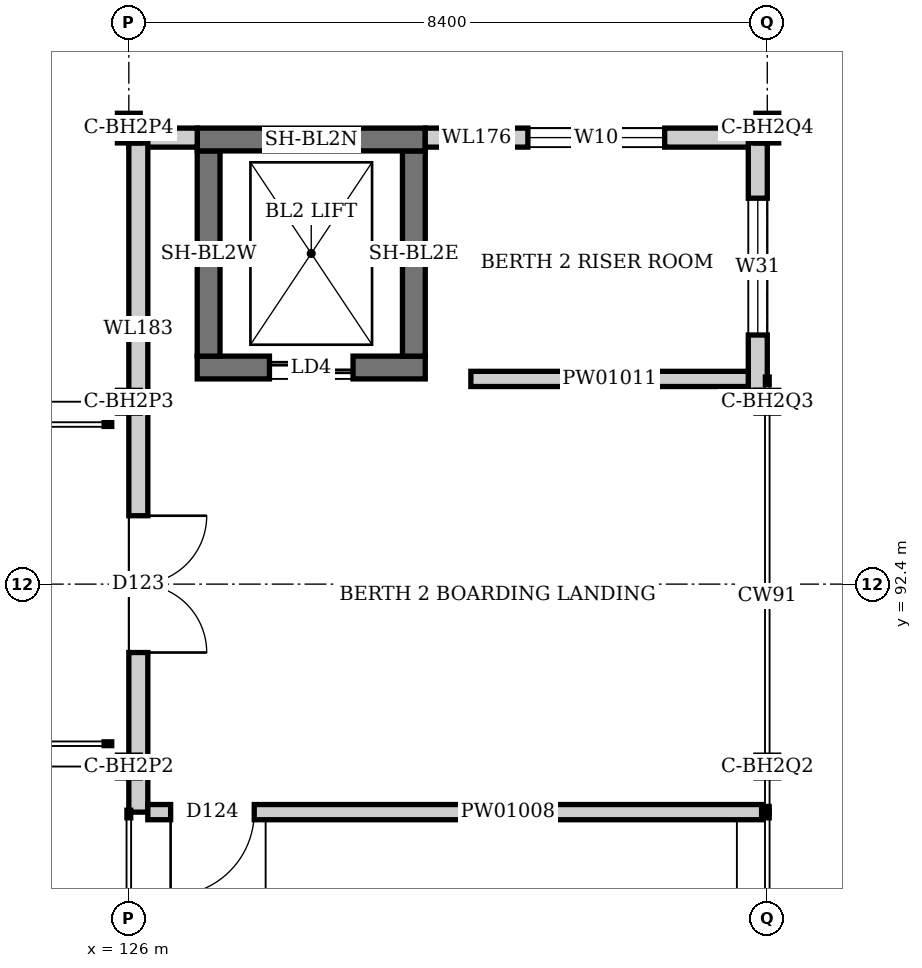
"""IFC4 building model, lengths in metres.
Left out: names, types, materials, properties, quantities, classifications, styles, units other than length and angle.
Written with IfcOpenShell. Run it as: python <this file> out.ifc"""

import sys

from ifc_helpers import new_model, si_unit, direction, frame, frame_2d, origin, origin_2d, place, context, subcontext, project, spatial, rectangle, i_section, extrude, element, fill, save


model = new_model("IFC4")
c1 = context("Model", 3, precision=1e-05, world=origin(), true_north=direction((0.0, 1.0)))
c2 = subcontext(c1, "Body", "Model", "MODEL_VIEW")
j1 = project(units=[si_unit("LENGTHUNIT", "METRE"), si_unit("PLANEANGLEUNIT", "RADIAN")], contexts=[c1])
p1 = place(None, origin())
s1 = spatial("IfcSite", under=j1, at=p1, CompositionType="ELEMENT")
p2 = place(p1, origin())
s2 = spatial("IfcBuilding", under=s1, at=p2, CompositionType="ELEMENT")
p3 = place(p2, frame((0.0, 0.0, 6.0)))
s3 = spatial("IfcBuildingStorey", under=s2, at=p3, CompositionType="ELEMENT", Elevation=6.0)
p4 = place(p3, frame((126.9, 95.25, 0.0), z_axis=(0.0, 0.0, 1.0), x_axis=(1.0, 0.0, 0.0)))
e1 = element("IfcWall", 1, at=p4, inside=s3, PredefinedType="SHEAR", context=c2, shape_type="SweptSolid", body=[
    extrude(rectangle(XDim=3.0, YDim=0.3, at=frame_2d((1.5, 0.0))), origin(), (0.0, 0.0, 1.0), 4.65),
])
p5 = place(p4, frame((0.95, 0.0, 0.0)))
e2 = element("IfcOpeningElement", 2, at=p5, cuts=e1, PredefinedType="OPENING", context=c2, shape_type="SweptSolid", body=[
    extrude(rectangle(XDim=1.1, YDim=2.1, at=frame_2d((0.55, 1.05))), frame((0.0, 0.16, 0.0), z_axis=(0.0, -1.0, 0.0), x_axis=(1.0, 0.0, 0.0)), (0.0, 0.0, 1.0), 0.32),
])
for number, where, z_axis, x_axis in (
    (3, (129.75, 95.4, 0.0), (0.0, 0.0, 1.0), (0.0, 1.0, 0.0)),
    (4, (127.05, 95.4, 0.0), (0.0, 0.0, 1.0), (0.0, 1.0, 0.0)),
):
    element("IfcWall", number, at=place(p3, frame(where, z_axis=z_axis, x_axis=x_axis)), inside=s3, PredefinedType="SHEAR", context=c2, shape_type="SweptSolid", body=[
        extrude(rectangle(XDim=2.7, YDim=0.3, at=frame_2d((1.35, 0.0))), origin(), (0.0, 0.0, 1.0), 4.65),
    ])
p6 = place(p3, frame((126.9, 98.25, 0.0), z_axis=(0.0, 0.0, 1.0), x_axis=(1.0, 0.0, 0.0)))
e5 = element("IfcWall", 5, at=p6, inside=s3, PredefinedType="SHEAR", context=c2, shape_type="SweptSolid", body=[
    extrude(rectangle(XDim=3.0, YDim=0.3, at=frame_2d((1.5, 0.0))), origin(), (0.0, 0.0, 1.0), 4.65),
])
for number, where, z_axis, x_axis in (
    (6, (126.0, 90.0, 0.0), (0.0, 0.0, 1.0), (1.0, 0.0, 0.0)),
    (7, (126.0, 94.8, 0.0), (0.0, 0.0, 1.0), (1.0, 0.0, 0.0)),
):
    element("IfcColumn", number, at=place(p3, frame(where, z_axis=z_axis, x_axis=x_axis)), inside=s3, PredefinedType="COLUMN", context=c2, shape_type="SweptSolid", body=[
        extrude(i_section(OverallWidth=0.3, OverallDepth=0.3, WebThickness=0.011, FlangeThickness=0.019, at=origin_2d()), origin(), (0.0, 0.0, 1.0), 4.8),
    ])
p7 = place(p3, frame((126.0, 98.4, 0.0), z_axis=(0.0, 0.0, 1.0), x_axis=(1.0, 0.0, 0.0)))
e8 = element("IfcColumn", 8, at=p7, inside=s3, PredefinedType="COLUMN", context=c2, shape_type="SweptSolid", body=[
    extrude(i_section(OverallWidth=0.3, OverallDepth=0.39, WebThickness=0.011, FlangeThickness=0.019, at=origin_2d()), origin(), (0.0, 0.0, 1.0), 4.8),
])
for number, where, z_axis, x_axis in (
    (9, (134.4, 90.0, 0.0), (0.0, 0.0, 1.0), (1.0, 0.0, 0.0)),
    (10, (134.4, 94.8, 0.0), (0.0, 0.0, 1.0), (1.0, 0.0, 0.0)),
):
    element("IfcColumn", number, at=place(p3, frame(where, z_axis=z_axis, x_axis=x_axis)), inside=s3, PredefinedType="COLUMN", context=c2, shape_type="SweptSolid", body=[
        extrude(i_section(OverallWidth=0.3, OverallDepth=0.3, WebThickness=0.011, FlangeThickness=0.019, at=origin_2d()), origin(), (0.0, 0.0, 1.0), 4.8),
    ])
p8 = place(p3, frame((134.4, 98.4, 0.0), z_axis=(0.0, 0.0, 1.0), x_axis=(1.0, 0.0, 0.0)))
e11 = element("IfcColumn", 11, at=p8, inside=s3, PredefinedType="COLUMN", context=c2, shape_type="SweptSolid", body=[
    extrude(i_section(OverallWidth=0.3, OverallDepth=0.39, WebThickness=0.011, FlangeThickness=0.019, at=origin_2d()), origin(), (0.0, 0.0, 1.0), 4.8),
])
p9 = place(p3, frame((126.0, 98.275, 0.0), z_axis=(0.0, 0.0, 1.0), x_axis=(1.0, 0.0, 0.0)))
e12 = element("IfcWall", 12, at=p9, inside=s3, PredefinedType="SOLIDWALL", context=c2, shape_type="SweptSolid", body=[
    extrude(rectangle(XDim=0.9, YDim=0.25, at=frame_2d((0.45, 0.0))), origin(), (0.0, 0.0, 1.0), 4.6),
])
p10 = place(p3, frame((129.9, 98.275, 0.0), z_axis=(0.0, 0.0, 1.0), x_axis=(1.0, 0.0, 0.0)))
e13 = element("IfcWall", 13, at=p10, inside=s3, PredefinedType="SOLIDWALL", context=c2, shape_type="SweptSolid", body=[
    extrude(rectangle(XDim=4.5, YDim=0.25, at=frame_2d((2.25, 0.0))), origin(), (0.0, 0.0, 1.0), 4.6),
])
p11 = place(p10, frame((1.35, 0.0, 0.9)))
e14 = element("IfcOpeningElement", 14, at=p11, cuts=e13, PredefinedType="OPENING", context=c2, shape_type="SweptSolid", body=[
    extrude(rectangle(XDim=1.8, YDim=1.8, at=frame_2d((0.9, 0.9))), frame((0.0, 0.135, 0.0), z_axis=(0.0, -1.0, 0.0), x_axis=(1.0, 0.0, 0.0)), (0.0, 0.0, 1.0), 0.27),
])
p12 = place(p3, frame((134.275, 94.95, 0.0), z_axis=(0.0, 0.0, 1.0), x_axis=(0.0, 1.0, 0.0)))
e15 = element("IfcWall", 15, at=p12, inside=s3, PredefinedType="SOLIDWALL", context=c2, shape_type="SweptSolid", body=[
    extrude(rectangle(XDim=3.255, YDim=0.25, at=frame_2d((1.627, 0.0))), origin(), (0.0, 0.0, 1.0), 4.6),
])
p13 = place(p12, frame((0.728, 0.0, 0.9)))
e16 = element("IfcOpeningElement", 16, at=p13, cuts=e15, PredefinedType="OPENING", context=c2, shape_type="SweptSolid", body=[
    extrude(rectangle(XDim=1.8, YDim=1.8, at=frame_2d((0.9, 0.9))), frame((0.0, 0.135, 0.0), z_axis=(0.0, -1.0, 0.0), x_axis=(1.0, 0.0, 0.0)), (0.0, 0.0, 1.0), 0.27),
])
p14 = place(p3, frame((126.125, 89.4, 0.0), z_axis=(0.0, 0.0, 1.0), x_axis=(0.0, 1.0, 0.0)))
e17 = element("IfcWall", 17, at=p14, inside=s3, PredefinedType="SOLIDWALL", context=c2, shape_type="SweptSolid", body=[
    extrude(rectangle(XDim=8.805, YDim=0.25, at=frame_2d((4.403, 0.0))), origin(), (0.0, 0.0, 1.0), 4.6),
])
p15 = place(p14, frame((2.1, 0.0, 0.0)))
e18 = element("IfcOpeningElement", 18, at=p15, cuts=e17, PredefinedType="OPENING", context=c2, shape_type="SweptSolid", body=[
    extrude(rectangle(XDim=1.8, YDim=2.0, at=frame_2d((0.9, 1.0))), frame((0.0, 0.135, 0.0), z_axis=(0.0, -1.0, 0.0), x_axis=(1.0, 0.0, 0.0)), (0.0, 0.0, 1.0), 0.27),
])
p16 = place(p3, frame((126.25, 89.4, 0.0), z_axis=(0.0, 0.0, 1.0), x_axis=(1.0, 0.0, 0.0)))
e19 = element("IfcWall", 19, at=p16, inside=s3, PredefinedType="PARTITIONING", context=c2, shape_type="SweptSolid", body=[
    extrude(rectangle(XDim=8.075, YDim=0.2, at=frame_2d((4.038, 0.0))), origin(), (0.0, 0.0, 1.0), 4.6),
])
p17 = place(p16, frame((0.3, 0.0, 0.0)))
e20 = element("IfcOpeningElement", 20, at=p17, cuts=e19, PredefinedType="OPENING", context=c2, shape_type="SweptSolid", body=[
    extrude(rectangle(XDim=1.1, YDim=2.4, at=frame_2d((0.55, 1.2))), frame((0.0, 0.11, 0.0), z_axis=(0.0, -1.0, 0.0), x_axis=(1.0, 0.0, 0.0)), (0.0, 0.0, 1.0), 0.22),
])
p18 = place(p3, frame((130.5, 95.1, 0.0), z_axis=(0.0, 0.0, 1.0), x_axis=(1.0, 0.0, 0.0)))
e21 = element("IfcWall", 21, at=p18, inside=s3, PredefinedType="PARTITIONING", context=c2, shape_type="SweptSolid", body=[
    extrude(rectangle(XDim=3.65, YDim=0.2, at=frame_2d((1.825, 0.0))), origin(), (0.0, 0.0, 1.0), 4.6),
])
p19 = place(p11, origin())
e22 = element("IfcWindow", 22, at=p19, inside=s3, PartitioningType="SINGLE_PANEL", PredefinedType="WINDOW", context=c2, shape_type="SweptSolid", body=[
    extrude(rectangle(XDim=1.8, YDim=1.8, at=frame_2d((0.9, 0.9))), frame((0.0, 0.03, 0.0), z_axis=(0.0, -1.0, 0.0), x_axis=(1.0, 0.0, 0.0)), (0.0, 0.0, 1.0), 0.06),
])
fill(e14, e22)
p20 = place(p13, origin())
e23 = element("IfcWindow", 23, at=p20, inside=s3, PartitioningType="SINGLE_PANEL", PredefinedType="WINDOW", context=c2, shape_type="SweptSolid", body=[
    extrude(rectangle(XDim=1.8, YDim=1.8, at=frame_2d((0.9, 0.9))), frame((0.0, 0.03, 0.0), z_axis=(0.0, -1.0, 0.0), x_axis=(1.0, 0.0, 0.0)), (0.0, 0.0, 1.0), 0.06),
])
fill(e16, e23)
p21 = place(p15, frame((1.8, 0.0, 0.0), z_axis=(0.0, 0.0, 1.0), x_axis=(-1.0, 0.0, 0.0)))
e24 = element("IfcDoor", 24, at=p21, inside=s3, OperationType="DOUBLE_DOOR_SINGLE_SWING", PredefinedType="DOOR", context=c2, shape_type="SweptSolid", body=[
    extrude(rectangle(XDim=1.8, YDim=2.0, at=frame_2d((0.9, 1.0))), frame((0.0, 0.025, 0.0), z_axis=(0.0, -1.0, 0.0), x_axis=(1.0, 0.0, 0.0)), (0.0, 0.0, 1.0), 0.05),
])
fill(e18, e24)
p22 = place(p17, frame((1.1, 0.0, 0.0), z_axis=(0.0, 0.0, 1.0), x_axis=(-1.0, 0.0, 0.0)))
e25 = element("IfcDoor", 25, at=p22, inside=s3, OperationType="SINGLE_SWING_RIGHT", PredefinedType="DOOR", context=c2, shape_type="SweptSolid", body=[
    extrude(rectangle(XDim=1.1, YDim=2.4, at=frame_2d((0.55, 1.2))), frame((0.0, 0.025, 0.0), z_axis=(0.0, -1.0, 0.0), x_axis=(1.0, 0.0, 0.0)), (0.0, 0.0, 1.0), 0.05),
])
fill(e20, e25)
p23 = place(p5, origin())
e26 = element("IfcDoor", 26, at=p23, inside=s3, OperationType="SLIDING_TO_LEFT", PredefinedType="DOOR", context=c2, shape_type="SweptSolid", body=[
    extrude(rectangle(XDim=1.1, YDim=2.1, at=frame_2d((0.55, 1.05))), frame((0.0, 0.025, 0.0), z_axis=(0.0, -1.0, 0.0), x_axis=(1.0, 0.0, 0.0)), (0.0, 0.0, 1.0), 0.05),
])
fill(e2, e26)
save(model, sys.argv[1])
